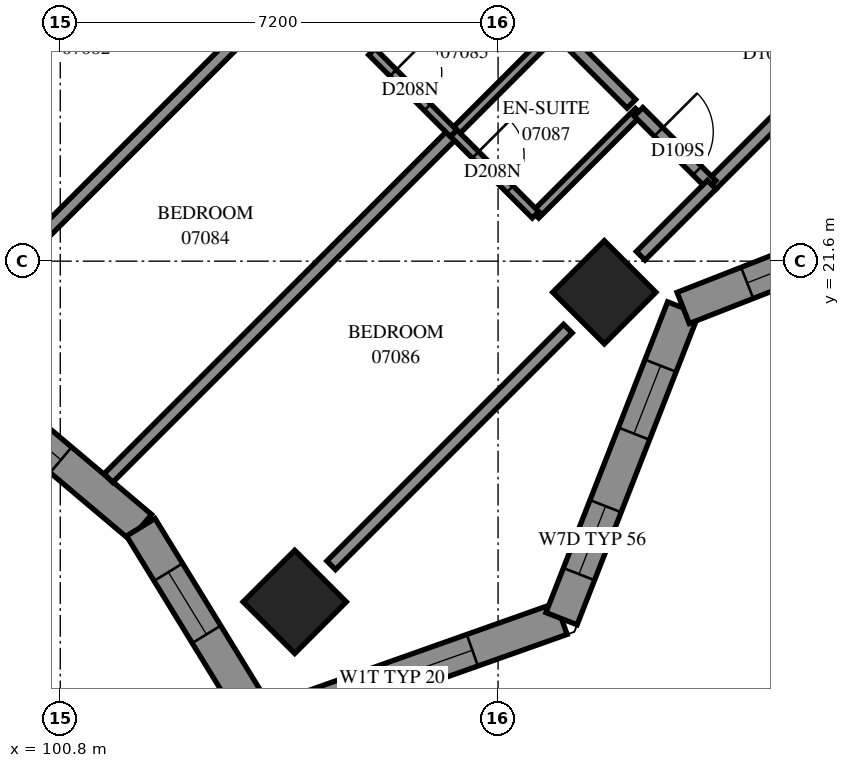
"""IFC4 building model, lengths in metres.
Left out: names, types, materials, properties, quantities, classifications, styles, units other than length and angle.
Written with IfcOpenShell. Run it as: python <this file> out.ifc"""

import sys

from ifc_helpers import new_model, si_unit, direction, frame, frame_2d, origin, origin_2d, place, context, subcontext, project, spatial, polyline, rectangle, outline, extrude, element, fill, save


model = new_model("IFC4")
c1 = context("Model", 3, precision=1e-05, world=origin(), true_north=direction((0.0, 1.0)))
c2 = subcontext(c1, "Body", "Model", "MODEL_VIEW")
j1 = project(units=[si_unit("LENGTHUNIT", "METRE"), si_unit("PLANEANGLEUNIT", "RADIAN")], contexts=[c1])
p1 = place(None, origin())
s1 = spatial("IfcSite", under=j1, at=p1, CompositionType="ELEMENT")
p2 = place(p1, origin())
s2 = spatial("IfcBuilding", under=s1, at=p2, CompositionType="ELEMENT")
p3 = place(p2, frame((0.0, 0.0, 30.4)))
s3 = spatial("IfcBuildingStorey", under=s2, at=p3, CompositionType="ELEMENT", Elevation=30.4)
for number, where, z_axis, x_axis in (
    (1, (109.747, 21.088, 0.0), (0.0, 0.0, 1.0), (0.707, -0.707, 0.0)),
    (2, (104.656, 15.997, 0.0), (0.0, 0.0, 1.0), (0.707, -0.707, 0.0)),
):
    element("IfcColumn", number, at=place(p3, frame(where, z_axis=z_axis, x_axis=x_axis)), inside=s3, PredefinedType="COLUMN", context=c2, shape_type="SweptSolid", body=[
        extrude(rectangle(XDim=1.2, YDim=1.2, at=origin_2d()), origin(), (0.0, 0.0, 1.0), 3.1),
    ])
p4 = place(p3, frame((104.116, 13.976, 0.0), z_axis=(0.0, 0.0, 1.0), x_axis=(0.9426203267, 0.3338666195, 0.0)))
e3 = element("IfcWall", 3, at=p4, inside=s3, PredefinedType="SOLIDWALL", context=c2, shape_type="SweptSolid", body=[
    extrude(outline(polyline([(-0.223, -0.275), (5.353, -0.275), (5.102, 0.275), (0.223, 0.275), (-0.223, -0.275)])), origin(), (0.0, 0.0, 1.0), 3.1),
])
p5 = place(p4, frame((0.871, 0.0, 0.5)))
e4 = element("IfcOpeningElement", 4, at=p5, cuts=e3, PredefinedType="OPENING", context=c2, shape_type="SweptSolid", body=[
    extrude(rectangle(XDim=2.8, YDim=2.45, at=frame_2d((1.4, 1.225))), frame((0.0, 0.285, 0.0), z_axis=(0.0, -1.0, 0.0), x_axis=(1.0, 0.0, 0.0)), (0.0, 0.0, 1.0), 0.57),
])
p6 = place(p3, frame((109.043, 15.721, 0.0), z_axis=(0.0, 0.0, 1.0), x_axis=(0.3646659578, 0.9311384103, 0.0)))
e5 = element("IfcWall", 5, at=p6, inside=s3, PredefinedType="SOLIDWALL", context=c2, shape_type="SweptSolid", body=[
    extrude(outline(polyline([(-0.126, -0.275), (5.367, -0.275), (5.607, 0.275), (0.126, 0.275), (-0.126, -0.275)])), origin(), (0.0, 0.0, 1.0), 3.1),
])
p7 = place(p6, frame((0.786, 0.0, 0.5)))
e6 = element("IfcOpeningElement", 6, at=p7, cuts=e5, PredefinedType="OPENING", context=c2, shape_type="SweptSolid", body=[
    extrude(rectangle(XDim=1.2, YDim=2.45, at=frame_2d((0.6, 1.225))), frame((0.0, 0.285, 0.0), z_axis=(0.0, -1.0, 0.0), x_axis=(1.0, 0.0, 0.0)), (0.0, 0.0, 1.0), 0.57),
])
p8 = place(p6, frame((3.267, 0.0, 0.5)))
e7 = element("IfcOpeningElement", 7, at=p8, cuts=e5, PredefinedType="OPENING", context=c2, shape_type="SweptSolid", body=[
    extrude(rectangle(XDim=1.2, YDim=2.45, at=frame_2d((0.6, 1.225))), frame((0.0, 0.285, 0.0), z_axis=(0.0, -1.0, 0.0), x_axis=(1.0, 0.0, 0.0)), (0.0, 0.0, 1.0), 0.57),
])
p9 = place(p3, frame((111.044, 20.83, 0.0), z_axis=(0.0, 0.0, 1.0), x_axis=(0.9311384103, 0.3646659578, 0.0)))
e8 = element("IfcWall", 8, at=p9, inside=s3, PredefinedType="SOLIDWALL", context=c2, shape_type="SweptSolid", body=[
    extrude(outline(polyline([(0.12, -0.275), (5.613, -0.275), (5.361, 0.275), (-0.12, 0.275), (0.12, -0.275)])), origin(), (0.0, 0.0, 1.0), 3.1),
])
p10 = place(p9, frame((1.13, 0.0, 0.5)))
e9 = element("IfcOpeningElement", 9, at=p10, cuts=e8, PredefinedType="OPENING", context=c2, shape_type="SweptSolid", body=[
    extrude(rectangle(XDim=2.8, YDim=2.45, at=frame_2d((1.4, 1.225))), frame((0.0, 0.285, 0.0), z_axis=(0.0, -1.0, 0.0), x_axis=(1.0, 0.0, 0.0)), (0.0, 0.0, 1.0), 0.57),
])
p11 = place(p3, frame((99.132, 19.747, 0.0), z_axis=(0.0, 0.0, 1.0), x_axis=(0.7645141753, -0.6446069156, 0.0)))
e10 = element("IfcWall", 10, at=p11, inside=s3, PredefinedType="SOLIDWALL", context=c2, shape_type="SweptSolid", body=[
    extrude(outline(polyline([(-0.023, -0.275), (3.869, -0.275), (3.958, 0.275), (0.023, 0.275), (-0.023, -0.275)])), origin(), (0.0, 0.0, 1.0), 3.1),
])
p12 = place(p11, frame((0.996, 0.0, 0.5)))
e11 = element("IfcOpeningElement", 11, at=p12, cuts=e10, PredefinedType="OPENING", context=c2, shape_type="SweptSolid", body=[
    extrude(rectangle(XDim=1.2, YDim=2.45, at=frame_2d((0.6, 1.225))), frame((0.0, 0.285, 0.0), z_axis=(0.0, -1.0, 0.0), x_axis=(1.0, 0.0, 0.0)), (0.0, 0.0, 1.0), 0.57),
])
p13 = place(p3, frame((102.124, 17.224, 0.0), z_axis=(0.0, 0.0, 1.0), x_axis=(0.5227306608, -0.8524978922, 0.0)))
e12 = element("IfcWall", 12, at=p13, inside=s3, PredefinedType="SOLIDWALL", context=c2, shape_type="SweptSolid", body=[
    extrude(outline(polyline([(0.044, -0.275), (4.033, -0.275), (3.588, 0.275), (-0.044, 0.275), (0.044, -0.275)])), origin(), (0.0, 0.0, 1.0), 3.1),
])
p14 = place(p13, frame((0.867, 0.0, 0.5)))
e13 = element("IfcOpeningElement", 13, at=p14, cuts=e12, PredefinedType="OPENING", context=c2, shape_type="SweptSolid", body=[
    extrude(rectangle(XDim=1.2, YDim=2.45, at=frame_2d((0.6, 1.225))), frame((0.0, 0.285, 0.0), z_axis=(0.0, -1.0, 0.0), x_axis=(1.0, 0.0, 0.0)), (0.0, 0.0, 1.0), 0.57),
])
p15 = place(p3, frame((102.609, 31.769, 0.0), z_axis=(0.0, 0.0, 1.0), x_axis=(0.7071067812, -0.7071067812, 0.0)))
e14 = element("IfcWall", 14, at=p15, inside=s3, PredefinedType="PARTITIONING", context=c2, shape_type="SweptSolid", body=[
    extrude(rectangle(XDim=10.723, YDim=0.2, at=frame_2d((5.361, 0.0))), origin(), (0.0, 0.0, 1.0), 3.1),
])
p16 = place(p15, frame((4.15, 0.0, 0.0)))
e15 = element("IfcOpeningElement", 15, at=p16, cuts=e14, PredefinedType="OPENING", context=c2, shape_type="SweptSolid", body=[
    extrude(rectangle(XDim=0.9, YDim=2.1, at=frame_2d((0.45, 1.05))), frame((0.0, 0.11, 0.0), z_axis=(0.0, -1.0, 0.0), x_axis=(1.0, 0.0, 0.0)), (0.0, 0.0, 1.0), 0.22),
])
p17 = place(p15, frame((5.8, 0.0, 0.0)))
e16 = element("IfcOpeningElement", 16, at=p17, cuts=e14, PredefinedType="OPENING", context=c2, shape_type="SweptSolid", body=[
    extrude(rectangle(XDim=0.9, YDim=2.1, at=frame_2d((0.45, 1.05))), frame((0.0, 0.11, 0.0), z_axis=(0.0, -1.0, 0.0), x_axis=(1.0, 0.0, 0.0)), (0.0, 0.0, 1.0), 0.22),
])
p18 = place(p3, frame((101.592, 18.033, 0.0), z_axis=(0.0, 0.0, 1.0), x_axis=(0.7072375867, 0.7069759514, 0.0)))
e17 = element("IfcWall", 17, at=p18, inside=s3, PredefinedType="PARTITIONING", context=c2, shape_type="SweptSolid", body=[
    extrude(rectangle(XDim=8.026, YDim=0.2, at=frame_2d((4.013, 0.0))), origin(), (0.0, 0.0, 1.0), 3.1),
])
p19 = place(p3, frame((96.538, 23.155, 0.0), z_axis=(0.0, 0.0, 1.0), x_axis=(0.7071130469, 0.7071005154, 0.0)))
e18 = element("IfcWall", 18, at=p19, inside=s3, PredefinedType="PARTITIONING", context=c2, shape_type="SweptSolid", body=[
    extrude(rectangle(XDim=7.98, YDim=0.2, at=frame_2d((3.99, 0.0))), origin(), (0.0, 0.0, 1.0), 3.1),
])
p20 = place(p3, frame((107.977, 29.499, 0.0), z_axis=(0.0, 0.0, 1.0), x_axis=(0.7071067812, -0.7071067812, 0.0)))
e19 = element("IfcWall", 19, at=p20, inside=s3, PredefinedType="PARTITIONING", context=c2, shape_type="SweptSolid", body=[
    extrude(rectangle(XDim=7.198, YDim=0.2, at=frame_2d((3.599, 0.0))), origin(), (0.0, 0.0, 1.0), 3.1),
])
p21 = place(p20, frame((0.247, 0.0, 0.0)))
e20 = element("IfcOpeningElement", 20, at=p21, cuts=e19, PredefinedType="OPENING", context=c2, shape_type="SweptSolid", body=[
    extrude(rectangle(XDim=0.9, YDim=2.1, at=frame_2d((0.45, 1.05))), frame((0.0, 0.11, 0.0), z_axis=(0.0, -1.0, 0.0), x_axis=(1.0, 0.0, 0.0)), (0.0, 0.0, 1.0), 0.22),
])
p22 = place(p20, frame((5.899, 0.0, 0.0)))
e21 = element("IfcOpeningElement", 21, at=p22, cuts=e19, PredefinedType="OPENING", context=c2, shape_type="SweptSolid", body=[
    extrude(rectangle(XDim=0.9, YDim=2.1, at=frame_2d((0.45, 1.05))), frame((0.0, 0.11, 0.0), z_axis=(0.0, -1.0, 0.0), x_axis=(1.0, 0.0, 0.0)), (0.0, 0.0, 1.0), 0.22),
])
p23 = place(p3, frame((105.255, 16.599, 0.0), z_axis=(0.0, 0.0, 1.0), x_axis=(0.7071067812, 0.7071067812, 0.0)))
e22 = element("IfcWall", 22, at=p23, inside=s3, PredefinedType="PARTITIONING", context=c2, shape_type="SweptSolid", body=[
    extrude(rectangle(XDim=5.504, YDim=0.2, at=frame_2d((2.752, 0.0))), origin(), (0.0, 0.0, 1.0), 2.6),
])
p24 = place(p3, frame((100.163, 21.689, 0.0), z_axis=(0.0, 0.0, 1.0), x_axis=(0.7071067812, 0.7071067812, 0.0)))
e23 = element("IfcWall", 23, at=p24, inside=s3, PredefinedType="PARTITIONING", context=c2, shape_type="SweptSolid", body=[
    extrude(rectangle(XDim=5.504, YDim=0.2, at=frame_2d((2.752, 0.0))), origin(), (0.0, 0.0, 1.0), 3.1),
])
for number, where, z_axis, x_axis in (
    (24, (105.927, 25.049, 0.0), (0.0, 0.0, 1.0), (0.707, 0.707, 0.0)),
    (25, (107.271, 23.705, 0.0), (0.0, 0.0, 1.0), (0.707, 0.707, 0.0)),
):
    element("IfcWall", number, at=place(p3, frame(where, z_axis=z_axis, x_axis=x_axis)), inside=s3, PredefinedType="PARTITIONING", context=c2, shape_type="SweptSolid", body=[
        extrude(rectangle(XDim=2.401, YDim=0.15, at=frame_2d((1.201, 0.0))), origin(), (0.0, 0.0, 1.0), 3.1),
    ])
p25 = place(p3, frame((108.615, 22.363, 0.0), z_axis=(0.0, 0.0, 1.0), x_axis=(0.7071067812, 0.7071067812, 0.0)))
e26 = element("IfcWall", 26, at=p25, inside=s3, PredefinedType="PARTITIONING", context=c2, shape_type="SweptSolid", body=[
    extrude(rectangle(XDim=2.398, YDim=0.15, at=frame_2d((1.199, 0.0))), origin(), (0.0, 0.0, 1.0), 3.1),
])
p26 = place(p3, frame((111.513, 22.857, 0.0), z_axis=(0.0, 0.0, 1.0), x_axis=(0.7071067812, 0.7071067812, 0.0)))
e27 = element("IfcWall", 27, at=p26, inside=s3, PredefinedType="PARTITIONING", context=c2, shape_type="SweptSolid", body=[
    extrude(rectangle(XDim=2.2, YDim=0.2, at=frame_2d((1.1, 0.0))), origin(), (0.0, 0.0, 1.0), 2.6),
])
p27 = place(p3, frame((105.925, 25.045, 0.0), z_axis=(0.0, 0.0, 1.0), x_axis=(0.7071067812, -0.7071067812, 0.0)))
e28 = element("IfcWall", 28, at=p27, inside=s3, PredefinedType="PARTITIONING", context=c2, shape_type="SweptSolid", body=[
    extrude(rectangle(XDim=1.901, YDim=0.15, at=frame_2d((0.95, 0.0))), origin(), (0.0, 0.0, 1.0), 3.1),
])
p28 = place(p27, frame((0.493, 0.0, 0.0)))
e29 = element("IfcOpeningElement", 29, at=p28, cuts=e28, PredefinedType="OPENING", context=c2, shape_type="SweptSolid", body=[
    extrude(rectangle(XDim=0.8, YDim=2.1, at=frame_2d((0.4, 1.05))), frame((0.0, 0.085, 0.0), z_axis=(0.0, -1.0, 0.0), x_axis=(1.0, 0.0, 0.0)), (0.0, 0.0, 1.0), 0.17),
])
p29 = place(p3, frame((107.272, 23.704, 0.0), z_axis=(0.0, 0.0, 1.0), x_axis=(0.7076330979, -0.7065800724, 0.0)))
e30 = element("IfcWall", 30, at=p29, inside=s3, PredefinedType="PARTITIONING", context=c2, shape_type="SweptSolid", body=[
    extrude(rectangle(XDim=1.899, YDim=0.15, at=frame_2d((0.95, 0.0))), origin(), (0.0, 0.0, 1.0), 3.1),
])
p30 = place(p29, frame((0.503, 0.0, 0.0)))
e31 = element("IfcOpeningElement", 31, at=p30, cuts=e30, PredefinedType="OPENING", context=c2, shape_type="SweptSolid", body=[
    extrude(rectangle(XDim=0.8, YDim=2.1, at=frame_2d((0.4, 1.05))), frame((0.0, 0.085, 0.0), z_axis=(0.0, -1.0, 0.0), x_axis=(1.0, 0.0, 0.0)), (0.0, 0.0, 1.0), 0.17),
])
p31 = place(p3, frame((110.309, 24.055, 0.0), z_axis=(0.0, 0.0, 1.0), x_axis=(0.7071067812, -0.7071067812, 0.0)))
e32 = element("IfcWall", 32, at=p31, inside=s3, PredefinedType="PARTITIONING", context=c2, shape_type="SweptSolid", body=[
    extrude(rectangle(XDim=1.7, YDim=0.2, at=frame_2d((0.85, 0.0))), origin(), (0.0, 0.0, 1.0), 3.1),
])
p32 = place(p31, frame((0.467, 0.0, 0.0)))
e33 = element("IfcOpeningElement", 33, at=p32, cuts=e32, PredefinedType="OPENING", context=c2, shape_type="SweptSolid", body=[
    extrude(rectangle(XDim=0.9, YDim=2.1, at=frame_2d((0.45, 1.05))), frame((0.0, 0.11, 0.0), z_axis=(0.0, -1.0, 0.0), x_axis=(1.0, 0.0, 0.0)), (0.0, 0.0, 1.0), 0.22),
])
p33 = place(p3, frame((110.346, 21.689, 0.0), z_axis=(0.0, 0.0, 1.0), x_axis=(0.7071067812, 0.7071067812, 0.0)))
e34 = element("IfcWall", 34, at=p33, inside=s3, PredefinedType="PARTITIONING", context=c2, shape_type="SweptSolid", body=[
    extrude(rectangle(XDim=1.652, YDim=0.2, at=frame_2d((0.826, 0.0))), origin(), (0.0, 0.0, 1.0), 2.6),
])
p34 = place(p5, origin())
e35 = element("IfcWindow", 35, at=p34, inside=s3, PartitioningType="SINGLE_PANEL", PredefinedType="WINDOW", context=c2, shape_type="SweptSolid", body=[
    extrude(rectangle(XDim=2.8, YDim=2.45, at=frame_2d((1.4, 1.225))), frame((0.0, 0.155, 0.0), z_axis=(0.0, -1.0, 0.0), x_axis=(1.0, 0.0, 0.0)), (0.0, 0.0, 1.0), 0.06),
])
fill(e4, e35)
p35 = place(p7, origin())
e36 = element("IfcWindow", 36, at=p35, inside=s3, PartitioningType="SINGLE_PANEL", PredefinedType="WINDOW", context=c2, shape_type="SweptSolid", body=[
    extrude(rectangle(XDim=1.2, YDim=2.45, at=frame_2d((0.6, 1.225))), frame((0.0, 0.155, 0.0), z_axis=(0.0, -1.0, 0.0), x_axis=(1.0, 0.0, 0.0)), (0.0, 0.0, 1.0), 0.06),
])
fill(e6, e36)
p36 = place(p8, origin())
e37 = element("IfcWindow", 37, at=p36, inside=s3, PartitioningType="SINGLE_PANEL", PredefinedType="WINDOW", context=c2, shape_type="SweptSolid", body=[
    extrude(rectangle(XDim=1.2, YDim=2.45, at=frame_2d((0.6, 1.225))), frame((0.0, 0.155, 0.0), z_axis=(0.0, -1.0, 0.0), x_axis=(1.0, 0.0, 0.0)), (0.0, 0.0, 1.0), 0.06),
])
fill(e7, e37)
p37 = place(p10, origin())
e38 = element("IfcWindow", 38, at=p37, inside=s3, PartitioningType="SINGLE_PANEL", PredefinedType="WINDOW", context=c2, shape_type="SweptSolid", body=[
    extrude(rectangle(XDim=2.8, YDim=2.45, at=frame_2d((1.4, 1.225))), frame((0.0, 0.155, 0.0), z_axis=(0.0, -1.0, 0.0), x_axis=(1.0, 0.0, 0.0)), (0.0, 0.0, 1.0), 0.06),
])
fill(e9, e38)
p38 = place(p12, origin())
e39 = element("IfcWindow", 39, at=p38, inside=s3, PartitioningType="SINGLE_PANEL", PredefinedType="WINDOW", context=c2, shape_type="SweptSolid", body=[
    extrude(rectangle(XDim=1.2, YDim=2.45, at=frame_2d((0.6, 1.225))), frame((0.0, 0.155, 0.0), z_axis=(0.0, -1.0, 0.0), x_axis=(1.0, 0.0, 0.0)), (0.0, 0.0, 1.0), 0.06),
])
fill(e11, e39)
p39 = place(p14, origin())
e40 = element("IfcWindow", 40, at=p39, inside=s3, PartitioningType="SINGLE_PANEL", PredefinedType="WINDOW", context=c2, shape_type="SweptSolid", body=[
    extrude(rectangle(XDim=1.2, YDim=2.45, at=frame_2d((0.6, 1.225))), frame((0.0, 0.155, 0.0), z_axis=(0.0, -1.0, 0.0), x_axis=(1.0, 0.0, 0.0)), (0.0, 0.0, 1.0), 0.06),
])
fill(e13, e40)
p40 = place(p28, origin())
e41 = element("IfcDoor", 41, at=p40, inside=s3, OperationType="SINGLE_SWING_RIGHT", PredefinedType="DOOR", context=c2, shape_type="SweptSolid", body=[
    extrude(rectangle(XDim=0.8, YDim=2.1, at=frame_2d((0.4, 1.05))), frame((0.0, 0.025, 0.0), z_axis=(0.0, -1.0, 0.0), x_axis=(1.0, 0.0, 0.0)), (0.0, 0.0, 1.0), 0.05),
])
fill(e29, e41)
p41 = place(p32, origin())
e42 = element("IfcDoor", 42, at=p41, inside=s3, OperationType="SINGLE_SWING_LEFT", PredefinedType="DOOR", context=c2, shape_type="SweptSolid", body=[
    extrude(rectangle(XDim=0.9, YDim=2.1, at=frame_2d((0.45, 1.05))), frame((0.0, 0.025, 0.0), z_axis=(0.0, -1.0, 0.0), x_axis=(1.0, 0.0, 0.0)), (0.0, 0.0, 1.0), 0.05),
])
fill(e33, e42)
p42 = place(p30, origin())
e43 = element("IfcDoor", 43, at=p42, inside=s3, OperationType="SINGLE_SWING_RIGHT", PredefinedType="DOOR", context=c2, shape_type="SweptSolid", body=[
    extrude(rectangle(XDim=0.8, YDim=2.1, at=frame_2d((0.4, 1.05))), frame((0.0, 0.025, 0.0), z_axis=(0.0, -1.0, 0.0), x_axis=(1.0, 0.0, 0.0)), (0.0, 0.0, 1.0), 0.05),
])
fill(e31, e43)
p43 = place(p22, origin())
e44 = element("IfcDoor", 44, at=p43, inside=s3, OperationType="SINGLE_SWING_RIGHT", PredefinedType="DOOR", context=c2, shape_type="SweptSolid", body=[
    extrude(rectangle(XDim=0.9, YDim=2.1, at=frame_2d((0.45, 1.05))), frame((0.0, 0.025, 0.0), z_axis=(0.0, -1.0, 0.0), x_axis=(1.0, 0.0, 0.0)), (0.0, 0.0, 1.0), 0.05),
])
fill(e21, e44)
save(model, sys.argv[1])
